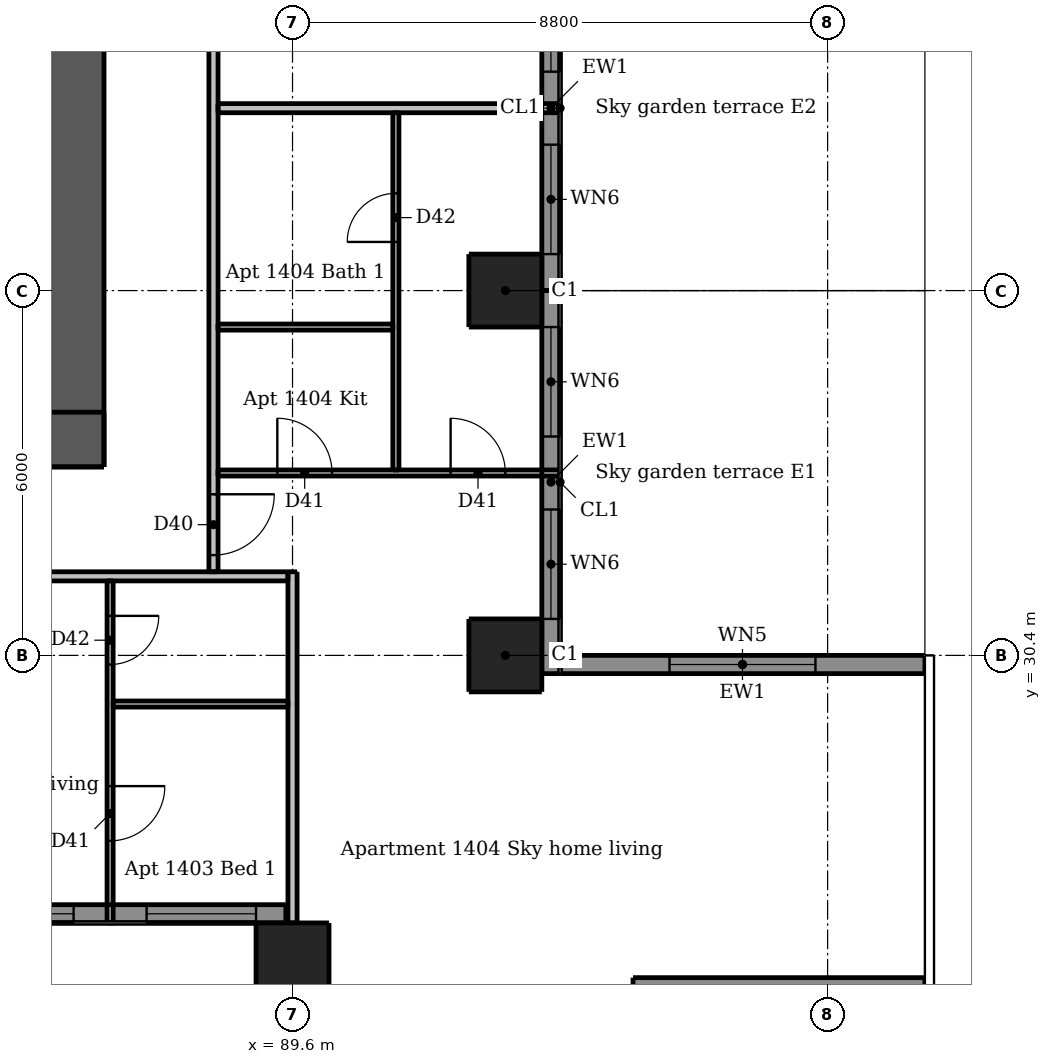
"""IFC4 building model, lengths in metres.
Left out: names, types, materials, properties, quantities, classifications, styles, units other than length and angle.
Written with IfcOpenShell. Run it as: python <this file> out.ifc"""

import sys

from ifc_helpers import new_model, si_unit, direction, frame, frame_2d, origin, origin_2d, place, context, subcontext, project, spatial, rectangle, extrude, element, fill, save


model = new_model("IFC4")
c1 = context("Model", 3, precision=1e-05, world=origin(), true_north=direction((0.0, 1.0)))
c2 = subcontext(c1, "Body", "Model", "MODEL_VIEW")
j1 = project(units=[si_unit("LENGTHUNIT", "METRE"), si_unit("PLANEANGLEUNIT", "RADIAN")], contexts=[c1])
p1 = place(None, origin())
s1 = spatial("IfcSite", under=j1, at=p1, CompositionType="ELEMENT")
p2 = place(p1, origin())
s2 = spatial("IfcBuilding", under=s1, at=p2, CompositionType="ELEMENT")
p3 = place(p2, frame((0.0, 0.0, 53.2)))
s3 = spatial("IfcBuildingStorey", under=s2, at=p3, CompositionType="ELEMENT", Elevation=53.2)
p4 = place(p3, frame((62.5, 33.95, 0.0), z_axis=(0.0, 0.0, 1.0), x_axis=(1.0, 0.0, 0.0)))
e1 = element("IfcWall", 1, at=p4, inside=s3, PredefinedType="SHEAR", context=c2, shape_type="SweptSolid", body=[
    extrude(rectangle(XDim=24.0, YDim=0.9, at=frame_2d((12.0, 0.0))), origin(), (0.0, 0.0, 1.0), 3.05),
])
p5 = place(p4, frame((2.05, 0.0, 0.0)))
e2 = element("IfcOpeningElement", 2, at=p5, cuts=e1, PredefinedType="OPENING", context=c2, shape_type="SweptSolid", body=[
    extrude(rectangle(XDim=1.1, YDim=2.1, at=frame_2d((0.55, 1.05))), frame((0.0, 0.46, 0.0), z_axis=(0.0, -1.0, 0.0), x_axis=(1.0, 0.0, 0.0)), (0.0, 0.0, 1.0), 0.92),
])
p6 = place(p4, frame((20.85, 0.0, 0.0)))
e3 = element("IfcOpeningElement", 3, at=p6, cuts=e1, PredefinedType="OPENING", context=c2, shape_type="SweptSolid", body=[
    extrude(rectangle(XDim=1.1, YDim=2.1, at=frame_2d((0.55, 1.05))), frame((0.0, 0.46, 0.0), z_axis=(0.0, -1.0, 0.0), x_axis=(1.0, 0.0, 0.0)), (0.0, 0.0, 1.0), 0.92),
])
p7 = place(p4, frame((8.0, 0.0, 0.0)))
e4 = element("IfcOpeningElement", 4, at=p7, cuts=e1, PredefinedType="OPENING", context=c2, shape_type="SweptSolid", body=[
    extrude(rectangle(XDim=1.1, YDim=2.1, at=frame_2d((0.55, 1.05))), frame((0.0, 0.46, 0.0), z_axis=(0.0, -1.0, 0.0), x_axis=(1.0, 0.0, 0.0)), (0.0, 0.0, 1.0), 0.92),
])
p8 = place(p4, frame((13.525, 0.0, 0.0)))
e5 = element("IfcOpeningElement", 5, at=p8, cuts=e1, PredefinedType="OPENING", context=c2, shape_type="SweptSolid", body=[
    extrude(rectangle(XDim=0.9, YDim=2.1, at=frame_2d((0.45, 1.05))), frame((0.0, 0.46, 0.0), z_axis=(0.0, -1.0, 0.0), x_axis=(1.0, 0.0, 0.0)), (0.0, 0.0, 1.0), 0.92),
])
p9 = place(p4, frame((17.075, 0.0, 0.0)))
e6 = element("IfcOpeningElement", 6, at=p9, cuts=e1, PredefinedType="OPENING", context=c2, shape_type="SweptSolid", body=[
    extrude(rectangle(XDim=0.9, YDim=2.1, at=frame_2d((0.45, 1.05))), frame((0.0, 0.46, 0.0), z_axis=(0.0, -1.0, 0.0), x_axis=(1.0, 0.0, 0.0)), (0.0, 0.0, 1.0), 0.92),
])
p10 = place(p3, frame((86.05, 33.5, 0.0), z_axis=(0.0, 0.0, 1.0), x_axis=(0.0, 1.0, 0.0)))
e7 = element("IfcWall", 7, at=p10, inside=s3, PredefinedType="SHEAR", context=c2, shape_type="SweptSolid", body=[
    extrude(rectangle(XDim=24.0, YDim=0.9, at=frame_2d((12.0, 0.0))), origin(), (0.0, 0.0, 1.0), 3.05),
])
p11 = place(p10, frame((11.2, 0.0, 0.0)))
e8 = element("IfcOpeningElement", 8, at=p11, cuts=e7, PredefinedType="OPENING", context=c2, shape_type="SweptSolid", body=[
    extrude(rectangle(XDim=1.6, YDim=2.1, at=frame_2d((0.8, 1.05))), frame((0.0, 0.46, 0.0), z_axis=(0.0, -1.0, 0.0), x_axis=(1.0, 0.0, 0.0)), (0.0, 0.0, 1.0), 0.92),
])
for number, where, z_axis, x_axis in (
    (9, (89.6, 25.4, 0.0), (0.0, 0.0, 1.0), (1.0, 0.0, 0.0)),
    (10, (93.1, 30.4, 0.0), (0.0, 0.0, 1.0), (1.0, 0.0, 0.0)),
    (11, (93.1, 36.4, 0.0), (0.0, 0.0, 1.0), (1.0, 0.0, 0.0)),
):
    element("IfcColumn", number, at=place(p3, frame(where, z_axis=z_axis, x_axis=x_axis)), inside=s3, PredefinedType="COLUMN", context=c2, shape_type="SweptSolid", body=[
        extrude(rectangle(XDim=1.2, YDim=1.2, at=origin_2d()), origin(), (0.0, 0.0, 1.0), 3.05),
    ])
p12 = place(p3, frame((95.2, 24.95, 0.0), z_axis=(0.0, 0.0, 1.0), x_axis=(1.0, 0.0, 0.0)))
e12 = element("IfcWall", 12, at=p12, inside=s3, PredefinedType="SOLIDWALL", context=c2, shape_type="SweptSolid", body=[
    extrude(rectangle(XDim=4.8, YDim=0.3, at=frame_2d((2.4, 0.0))), origin(), (0.0, 0.0, 1.0), 3.05),
])
p13 = place(p3, frame((100.0, 30.25, 0.0), z_axis=(0.0, 0.0, 1.0), x_axis=(-1.0, 0.0, 0.0)))
e13 = element("IfcWall", 13, at=p13, inside=s3, PredefinedType="SOLIDWALL", context=c2, shape_type="SweptSolid", body=[
    extrude(rectangle(XDim=6.0, YDim=0.3, at=frame_2d((3.0, 0.0))), origin(), (0.0, 0.0, 1.0), 3.05),
])
p14 = place(p13, frame((1.8, 0.0, 0.15)))
e14 = element("IfcOpeningElement", 14, at=p14, cuts=e13, PredefinedType="OPENING", context=c2, shape_type="SweptSolid", body=[
    extrude(rectangle(XDim=2.4, YDim=2.1, at=frame_2d((1.2, 1.05))), frame((0.0, 0.16, 0.0), z_axis=(0.0, -1.0, 0.0), x_axis=(1.0, 0.0, 0.0)), (0.0, 0.0, 1.0), 0.32),
])
p15 = place(p3, frame((83.6, 26.15, 0.0), z_axis=(0.0, 0.0, 1.0), x_axis=(1.0, 0.0, 0.0)))
e15 = element("IfcWall", 15, at=p15, inside=s3, PredefinedType="SOLIDWALL", context=c2, shape_type="SweptSolid", body=[
    extrude(rectangle(XDim=5.89, YDim=0.3, at=frame_2d((2.945, 0.0))), origin(), (0.0, 0.0, 1.0), 3.05),
])
p16 = place(p15, frame((0.6, 0.0, 0.15)))
e16 = element("IfcOpeningElement", 16, at=p16, cuts=e15, PredefinedType="OPENING", context=c2, shape_type="SweptSolid", body=[
    extrude(rectangle(XDim=1.8, YDim=2.1, at=frame_2d((0.9, 1.05))), frame((0.0, 0.16, 0.0), z_axis=(0.0, -1.0, 0.0), x_axis=(1.0, 0.0, 0.0)), (0.0, 0.0, 1.0), 0.32),
])
p17 = place(p15, frame((3.6, 0.0, 0.15)))
e17 = element("IfcOpeningElement", 17, at=p17, cuts=e15, PredefinedType="OPENING", context=c2, shape_type="SweptSolid", body=[
    extrude(rectangle(XDim=1.8, YDim=2.1, at=frame_2d((0.9, 1.05))), frame((0.0, 0.16, 0.0), z_axis=(0.0, -1.0, 0.0), x_axis=(1.0, 0.0, 0.0)), (0.0, 0.0, 1.0), 0.32),
])
p18 = place(p3, frame((93.85, 30.1, 0.0), z_axis=(0.0, 0.0, 1.0), x_axis=(0.0, 1.0, 0.0)))
e18 = element("IfcWall", 18, at=p18, inside=s3, PredefinedType="SOLIDWALL", context=c2, shape_type="SweptSolid", body=[
    extrude(rectangle(XDim=6.3, YDim=0.3, at=frame_2d((3.15, 0.0))), origin(), (0.0, 0.0, 1.0), 3.05),
])
p19 = place(p18, frame((0.9, 0.0, 0.15)))
e19 = element("IfcOpeningElement", 19, at=p19, cuts=e18, PredefinedType="OPENING", context=c2, shape_type="SweptSolid", body=[
    extrude(rectangle(XDim=1.8, YDim=2.1, at=frame_2d((0.9, 1.05))), frame((0.0, 0.16, 0.0), z_axis=(0.0, -1.0, 0.0), x_axis=(1.0, 0.0, 0.0)), (0.0, 0.0, 1.0), 0.32),
])
p20 = place(p18, frame((3.9, 0.0, 0.15)))
e20 = element("IfcOpeningElement", 20, at=p20, cuts=e18, PredefinedType="OPENING", context=c2, shape_type="SweptSolid", body=[
    extrude(rectangle(XDim=1.8, YDim=2.1, at=frame_2d((0.9, 1.05))), frame((0.0, 0.16, 0.0), z_axis=(0.0, -1.0, 0.0), x_axis=(1.0, 0.0, 0.0)), (0.0, 0.0, 1.0), 0.32),
])
p21 = place(p3, frame((93.85, 36.4, 0.0), z_axis=(0.0, 0.0, 1.0), x_axis=(0.0, 1.0, 0.0)))
e21 = element("IfcWall", 21, at=p21, inside=s3, PredefinedType="SOLIDWALL", context=c2, shape_type="SweptSolid", body=[
    extrude(rectangle(XDim=6.0, YDim=0.3, at=frame_2d((3.0, 0.0))), origin(), (0.0, 0.0, 1.0), 3.05),
])
p22 = place(p21, frame((0.6, 0.0, 0.15)))
e22 = element("IfcOpeningElement", 22, at=p22, cuts=e21, PredefinedType="OPENING", context=c2, shape_type="SweptSolid", body=[
    extrude(rectangle(XDim=1.8, YDim=2.1, at=frame_2d((0.9, 1.05))), frame((0.0, 0.16, 0.0), z_axis=(0.0, -1.0, 0.0), x_axis=(1.0, 0.0, 0.0)), (0.0, 0.0, 1.0), 0.32),
])
p23 = place(p21, frame((3.6, 0.0, 0.15)))
e23 = element("IfcOpeningElement", 23, at=p23, cuts=e21, PredefinedType="OPENING", context=c2, shape_type="SweptSolid", body=[
    extrude(rectangle(XDim=1.8, YDim=2.1, at=frame_2d((0.9, 1.05))), frame((0.0, 0.16, 0.0), z_axis=(0.0, -1.0, 0.0), x_axis=(1.0, 0.0, 0.0)), (0.0, 0.0, 1.0), 0.32),
])
p24 = place(p3, frame((86.6, 31.625, 0.0), z_axis=(0.0, 0.0, 1.0), x_axis=(0.0, -1.0, 0.0)))
e24 = element("IfcWall", 24, at=p24, inside=s3, PredefinedType="PARTITIONING", context=c2, shape_type="SweptSolid", body=[
    extrude(rectangle(XDim=5.625, YDim=0.1, at=frame_2d((2.812, 0.0))), origin(), (0.0, 0.0, 1.0), 3.05),
])
p25 = place(p24, frame((3.375, 0.0, 0.0)))
e25 = element("IfcOpeningElement", 25, at=p25, cuts=e24, PredefinedType="OPENING", context=c2, shape_type="SweptSolid", body=[
    extrude(rectangle(XDim=0.9, YDim=2.1, at=frame_2d((0.45, 1.05))), frame((0.0, 0.06, 0.0), z_axis=(0.0, -1.0, 0.0), x_axis=(1.0, 0.0, 0.0)), (0.0, 0.0, 1.0), 0.12),
])
p26 = place(p24, frame((0.575, 0.0, 0.0)))
e26 = element("IfcOpeningElement", 26, at=p26, cuts=e24, PredefinedType="OPENING", context=c2, shape_type="SweptSolid", body=[
    extrude(rectangle(XDim=0.8, YDim=2.1, at=frame_2d((0.4, 1.05))), frame((0.0, 0.06, 0.0), z_axis=(0.0, -1.0, 0.0), x_axis=(1.0, 0.0, 0.0)), (0.0, 0.0, 1.0), 0.12),
])
p27 = place(p3, frame((91.3, 33.45, 0.0), z_axis=(0.0, 0.0, 1.0), x_axis=(0.0, 1.0, 0.0)))
e27 = element("IfcWall", 27, at=p27, inside=s3, PredefinedType="PARTITIONING", context=c2, shape_type="SweptSolid", body=[
    extrude(rectangle(XDim=5.875, YDim=0.1, at=frame_2d((2.938, 0.0))), origin(), (0.0, 0.0, 1.0), 3.05),
])
p28 = place(p27, frame((3.75, 0.0, 0.0)))
e28 = element("IfcOpeningElement", 28, at=p28, cuts=e27, PredefinedType="OPENING", context=c2, shape_type="SweptSolid", body=[
    extrude(rectangle(XDim=0.8, YDim=2.1, at=frame_2d((0.4, 1.05))), frame((0.0, 0.06, 0.0), z_axis=(0.0, -1.0, 0.0), x_axis=(1.0, 0.0, 0.0)), (0.0, 0.0, 1.0), 0.12),
])
p29 = place(p3, frame((88.375, 35.8, 0.0), z_axis=(0.0, 0.0, 1.0), x_axis=(1.0, 0.0, 0.0)))
e29 = element("IfcWall", 29, at=p29, inside=s3, PredefinedType="PARTITIONING", context=c2, shape_type="SweptSolid", body=[
    extrude(rectangle(XDim=2.875, YDim=0.1, at=frame_2d((1.438, 0.0))), origin(), (0.0, 0.0, 1.0), 3.05),
])
p30 = place(p3, frame((88.375, 33.4, 0.0), z_axis=(0.0, 0.0, 1.0), x_axis=(1.0, 0.0, 0.0)))
e30 = element("IfcWall", 30, at=p30, inside=s3, PredefinedType="PARTITIONING", context=c2, shape_type="SweptSolid", body=[
    extrude(rectangle(XDim=5.625, YDim=0.1, at=frame_2d((2.812, 0.0))), origin(), (0.0, 0.0, 1.0), 3.05),
])
p31 = place(p30, frame((0.975, 0.0, 0.0)))
e31 = element("IfcOpeningElement", 31, at=p31, cuts=e30, PredefinedType="OPENING", context=c2, shape_type="SweptSolid", body=[
    extrude(rectangle(XDim=0.9, YDim=2.1, at=frame_2d((0.45, 1.05))), frame((0.0, 0.06, 0.0), z_axis=(0.0, -1.0, 0.0), x_axis=(1.0, 0.0, 0.0)), (0.0, 0.0, 1.0), 0.12),
])
p32 = place(p30, frame((3.825, 0.0, 0.0)))
e32 = element("IfcOpeningElement", 32, at=p32, cuts=e30, PredefinedType="OPENING", context=c2, shape_type="SweptSolid", body=[
    extrude(rectangle(XDim=0.9, YDim=2.1, at=frame_2d((0.45, 1.05))), frame((0.0, 0.06, 0.0), z_axis=(0.0, -1.0, 0.0), x_axis=(1.0, 0.0, 0.0)), (0.0, 0.0, 1.0), 0.12),
])
p33 = place(p3, frame((86.65, 29.6, 0.0), z_axis=(0.0, 0.0, 1.0), x_axis=(1.0, 0.0, 0.0)))
e33 = element("IfcWall", 33, at=p33, inside=s3, PredefinedType="PARTITIONING", context=c2, shape_type="SweptSolid", body=[
    extrude(rectangle(XDim=2.875, YDim=0.1, at=frame_2d((1.438, 0.0))), origin(), (0.0, 0.0, 1.0), 3.05),
])
p34 = place(p3, frame((88.3, 60.475, 0.0), z_axis=(0.0, 0.0, 1.0), x_axis=(0.0, -1.0, 0.0)))
e34 = element("IfcWall", 34, at=p34, inside=s3, PredefinedType="PARTITIONING", context=c2, shape_type="SweptSolid", body=[
    extrude(rectangle(XDim=28.7, YDim=0.15, at=frame_2d((14.35, 0.0))), origin(), (0.0, 0.0, 1.0), 3.05),
])
p35 = place(p34, frame((27.425, 0.0, 0.0)))
e35 = element("IfcOpeningElement", 35, at=p35, cuts=e34, PredefinedType="OPENING", context=c2, shape_type="SweptSolid", body=[
    extrude(rectangle(XDim=1.0, YDim=2.1, at=frame_2d((0.5, 1.05))), frame((0.0, 0.085, 0.0), z_axis=(0.0, -1.0, 0.0), x_axis=(1.0, 0.0, 0.0)), (0.0, 0.0, 1.0), 0.17),
])
p36 = place(p34, frame((11.575, 0.0, 0.0)))
e36 = element("IfcOpeningElement", 36, at=p36, cuts=e34, PredefinedType="OPENING", context=c2, shape_type="SweptSolid", body=[
    extrude(rectangle(XDim=1.0, YDim=2.1, at=frame_2d((0.5, 1.05))), frame((0.0, 0.085, 0.0), z_axis=(0.0, -1.0, 0.0), x_axis=(1.0, 0.0, 0.0)), (0.0, 0.0, 1.0), 0.17),
])
p37 = place(p34, frame((2.575, 0.0, 0.0)))
e37 = element("IfcOpeningElement", 37, at=p37, cuts=e34, PredefinedType="OPENING", context=c2, shape_type="SweptSolid", body=[
    extrude(rectangle(XDim=1.0, YDim=2.1, at=frame_2d((0.5, 1.05))), frame((0.0, 0.085, 0.0), z_axis=(0.0, -1.0, 0.0), x_axis=(1.0, 0.0, 0.0)), (0.0, 0.0, 1.0), 0.17),
])
p38 = place(p3, frame((89.6, 26.0, 0.0), z_axis=(0.0, 0.0, 1.0), x_axis=(0.0, 1.0, 0.0)))
e38 = element("IfcWall", 38, at=p38, inside=s3, PredefinedType="PARTITIONING", context=c2, shape_type="SweptSolid", body=[
    extrude(rectangle(XDim=5.775, YDim=0.15, at=frame_2d((2.887, 0.0))), origin(), (0.0, 0.0, 1.0), 2.516),
])
p39 = place(p3, frame((88.375, 39.4, 0.0), z_axis=(0.0, 0.0, 1.0), x_axis=(1.0, 0.0, 0.0)))
e39 = element("IfcWall", 39, at=p39, inside=s3, PredefinedType="PARTITIONING", context=c2, shape_type="SweptSolid", body=[
    extrude(rectangle(XDim=5.625, YDim=0.15, at=frame_2d((2.812, 0.0))), origin(), (0.0, 0.0, 1.0), 3.05),
])
p40 = place(p3, frame((89.525, 31.7, 0.0), z_axis=(0.0, 0.0, 1.0), x_axis=(-1.0, 0.0, 0.0)))
e40 = element("IfcWall", 40, at=p40, inside=s3, PredefinedType="PARTITIONING", context=c2, shape_type="SweptSolid", body=[
    extrude(rectangle(XDim=28.75, YDim=0.15, at=frame_2d((14.375, 0.0))), origin(), (0.0, 0.0, 1.0), 3.05),
])
p41 = place(p40, frame((27.375, 0.0, 0.0)))
e41 = element("IfcOpeningElement", 41, at=p41, cuts=e40, PredefinedType="OPENING", context=c2, shape_type="SweptSolid", body=[
    extrude(rectangle(XDim=1.0, YDim=2.1, at=frame_2d((0.5, 1.05))), frame((0.0, 0.085, 0.0), z_axis=(0.0, -1.0, 0.0), x_axis=(1.0, 0.0, 0.0)), (0.0, 0.0, 1.0), 0.17),
])
p42 = place(p40, frame((12.625, 0.0, 0.0)))
e42 = element("IfcOpeningElement", 42, at=p42, cuts=e40, PredefinedType="OPENING", context=c2, shape_type="SweptSolid", body=[
    extrude(rectangle(XDim=1.0, YDim=2.1, at=frame_2d((0.5, 1.05))), frame((0.0, 0.085, 0.0), z_axis=(0.0, -1.0, 0.0), x_axis=(1.0, 0.0, 0.0)), (0.0, 0.0, 1.0), 0.17),
])
p43 = place(p40, frame((4.225, 0.0, 0.0)))
e43 = element("IfcOpeningElement", 43, at=p43, cuts=e40, PredefinedType="OPENING", context=c2, shape_type="SweptSolid", body=[
    extrude(rectangle(XDim=1.0, YDim=2.1, at=frame_2d((0.5, 1.05))), frame((0.0, 0.085, 0.0), z_axis=(0.0, -1.0, 0.0), x_axis=(1.0, 0.0, 0.0)), (0.0, 0.0, 1.0), 0.17),
])
p44 = place(p14, origin())
e44 = element("IfcWindow", 44, at=p44, inside=s3, PartitioningType="DOUBLE_PANEL_VERTICAL", PredefinedType="WINDOW", context=c2, shape_type="SweptSolid", body=[
    extrude(rectangle(XDim=2.4, YDim=2.1, at=frame_2d((1.2, 1.05))), frame((0.0, 0.03, 0.0), z_axis=(0.0, -1.0, 0.0), x_axis=(1.0, 0.0, 0.0)), (0.0, 0.0, 1.0), 0.06),
])
fill(e14, e44)
p45 = place(p16, origin())
e45 = element("IfcWindow", 45, at=p45, inside=s3, PartitioningType="DOUBLE_PANEL_VERTICAL", PredefinedType="WINDOW", context=c2, shape_type="SweptSolid", body=[
    extrude(rectangle(XDim=1.8, YDim=2.1, at=frame_2d((0.9, 1.05))), frame((0.0, 0.03, 0.0), z_axis=(0.0, -1.0, 0.0), x_axis=(1.0, 0.0, 0.0)), (0.0, 0.0, 1.0), 0.06),
])
fill(e16, e45)
p46 = place(p17, origin())
e46 = element("IfcWindow", 46, at=p46, inside=s3, PartitioningType="DOUBLE_PANEL_VERTICAL", PredefinedType="WINDOW", context=c2, shape_type="SweptSolid", body=[
    extrude(rectangle(XDim=1.8, YDim=2.1, at=frame_2d((0.9, 1.05))), frame((0.0, 0.03, 0.0), z_axis=(0.0, -1.0, 0.0), x_axis=(1.0, 0.0, 0.0)), (0.0, 0.0, 1.0), 0.06),
])
fill(e17, e46)
p47 = place(p19, origin())
e47 = element("IfcWindow", 47, at=p47, inside=s3, PartitioningType="DOUBLE_PANEL_VERTICAL", PredefinedType="WINDOW", context=c2, shape_type="SweptSolid", body=[
    extrude(rectangle(XDim=1.8, YDim=2.1, at=frame_2d((0.9, 1.05))), frame((0.0, 0.03, 0.0), z_axis=(0.0, -1.0, 0.0), x_axis=(1.0, 0.0, 0.0)), (0.0, 0.0, 1.0), 0.06),
])
fill(e19, e47)
p48 = place(p20, origin())
e48 = element("IfcWindow", 48, at=p48, inside=s3, PartitioningType="DOUBLE_PANEL_VERTICAL", PredefinedType="WINDOW", context=c2, shape_type="SweptSolid", body=[
    extrude(rectangle(XDim=1.8, YDim=2.1, at=frame_2d((0.9, 1.05))), frame((0.0, 0.03, 0.0), z_axis=(0.0, -1.0, 0.0), x_axis=(1.0, 0.0, 0.0)), (0.0, 0.0, 1.0), 0.06),
])
fill(e20, e48)
p49 = place(p22, origin())
e49 = element("IfcWindow", 49, at=p49, inside=s3, PartitioningType="DOUBLE_PANEL_VERTICAL", PredefinedType="WINDOW", context=c2, shape_type="SweptSolid", body=[
    extrude(rectangle(XDim=1.8, YDim=2.1, at=frame_2d((0.9, 1.05))), frame((0.0, 0.03, 0.0), z_axis=(0.0, -1.0, 0.0), x_axis=(1.0, 0.0, 0.0)), (0.0, 0.0, 1.0), 0.06),
])
fill(e22, e49)
p50 = place(p23, origin())
e50 = element("IfcWindow", 50, at=p50, inside=s3, PartitioningType="DOUBLE_PANEL_VERTICAL", PredefinedType="WINDOW", context=c2, shape_type="SweptSolid", body=[
    extrude(rectangle(XDim=1.8, YDim=2.1, at=frame_2d((0.9, 1.05))), frame((0.0, 0.03, 0.0), z_axis=(0.0, -1.0, 0.0), x_axis=(1.0, 0.0, 0.0)), (0.0, 0.0, 1.0), 0.06),
])
fill(e23, e50)
p51 = place(p25, origin())
e51 = element("IfcDoor", 51, at=p51, inside=s3, OperationType="SINGLE_SWING_LEFT", PredefinedType="DOOR", context=c2, shape_type="SweptSolid", body=[
    extrude(rectangle(XDim=0.9, YDim=2.1, at=frame_2d((0.45, 1.05))), frame((0.0, 0.025, 0.0), z_axis=(0.0, -1.0, 0.0), x_axis=(1.0, 0.0, 0.0)), (0.0, 0.0, 1.0), 0.05),
])
fill(e25, e51)
p52 = place(p26, origin())
e52 = element("IfcDoor", 52, at=p52, inside=s3, OperationType="SINGLE_SWING_LEFT", PredefinedType="DOOR", context=c2, shape_type="SweptSolid", body=[
    extrude(rectangle(XDim=0.8, YDim=2.1, at=frame_2d((0.4, 1.05))), frame((0.0, 0.025, 0.0), z_axis=(0.0, -1.0, 0.0), x_axis=(1.0, 0.0, 0.0)), (0.0, 0.0, 1.0), 0.05),
])
fill(e26, e52)
p53 = place(p35, origin())
e53 = element("IfcDoor", 53, at=p53, inside=s3, OperationType="SINGLE_SWING_LEFT", PredefinedType="DOOR", context=c2, shape_type="SweptSolid", body=[
    extrude(rectangle(XDim=1.0, YDim=2.1, at=frame_2d((0.5, 1.05))), frame((0.0, 0.025, 0.0), z_axis=(0.0, -1.0, 0.0), x_axis=(1.0, 0.0, 0.0)), (0.0, 0.0, 1.0), 0.05),
])
fill(e35, e53)
p54 = place(p31, origin())
e54 = element("IfcDoor", 54, at=p54, inside=s3, OperationType="SINGLE_SWING_LEFT", PredefinedType="DOOR", context=c2, shape_type="SweptSolid", body=[
    extrude(rectangle(XDim=0.9, YDim=2.1, at=frame_2d((0.45, 1.05))), frame((0.0, 0.025, 0.0), z_axis=(0.0, -1.0, 0.0), x_axis=(1.0, 0.0, 0.0)), (0.0, 0.0, 1.0), 0.05),
])
fill(e31, e54)
p55 = place(p32, origin())
e55 = element("IfcDoor", 55, at=p55, inside=s3, OperationType="SINGLE_SWING_LEFT", PredefinedType="DOOR", context=c2, shape_type="SweptSolid", body=[
    extrude(rectangle(XDim=0.9, YDim=2.1, at=frame_2d((0.45, 1.05))), frame((0.0, 0.025, 0.0), z_axis=(0.0, -1.0, 0.0), x_axis=(1.0, 0.0, 0.0)), (0.0, 0.0, 1.0), 0.05),
])
fill(e32, e55)
p56 = place(p28, origin())
e56 = element("IfcDoor", 56, at=p56, inside=s3, OperationType="SINGLE_SWING_LEFT", PredefinedType="DOOR", context=c2, shape_type="SweptSolid", body=[
    extrude(rectangle(XDim=0.8, YDim=2.1, at=frame_2d((0.4, 1.05))), frame((0.0, 0.025, 0.0), z_axis=(0.0, -1.0, 0.0), x_axis=(1.0, 0.0, 0.0)), (0.0, 0.0, 1.0), 0.05),
])
fill(e28, e56)
save(model, sys.argv[1])
